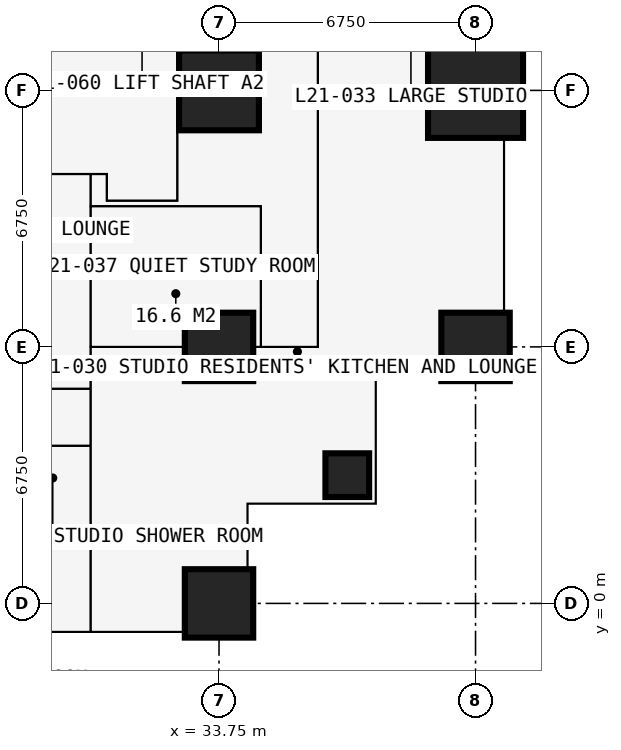
"""IFC4 building model, lengths in metres.
Left out: names, types, materials, properties, quantities, classifications, styles, units other than length and angle.
Written with IfcOpenShell. Run it as: python <this file> out.ifc"""

import sys

from ifc_helpers import new_model, si_unit, direction, frame, frame_2d, origin, origin_2d, place, context, subcontext, project, spatial, rectangle, extrude, element, fill, save


model = new_model("IFC4")
c1 = context("Model", 3, precision=1e-05, world=origin(), true_north=direction((0.0, 1.0)))
c2 = subcontext(c1, "Body", "Model", "MODEL_VIEW")
j1 = project(units=[si_unit("LENGTHUNIT", "METRE"), si_unit("PLANEANGLEUNIT", "RADIAN")], contexts=[c1])
p1 = place(None, origin())
s1 = spatial("IfcSite", under=j1, at=p1, CompositionType="ELEMENT")
p2 = place(p1, origin())
s2 = spatial("IfcBuilding", under=s1, at=p2, CompositionType="ELEMENT")
p3 = place(p2, frame((0.0, 0.0, 80.1)))
s3 = spatial("IfcBuildingStorey", under=s2, at=p3, CompositionType="ELEMENT", Elevation=80.1)
for number, where, z_axis, x_axis in (
    (1, (33.75, 0.0, 0.0), (0.0, 0.0, 1.0), (1.0, 0.0, 0.0)),
    (2, (33.75, 6.75, 0.0), (0.0, 0.0, 1.0), (1.0, 0.0, 0.0)),
):
    element("IfcColumn", number, at=place(p3, frame(where, z_axis=z_axis, x_axis=x_axis)), inside=s3, PredefinedType="COLUMN", context=c2, shape_type="SweptSolid", body=[
        extrude(rectangle(XDim=1.8, YDim=1.8, at=origin_2d()), origin(), (0.0, 0.0, 1.0), 3.6),
    ])
p4 = place(p3, frame((33.75, 13.5, 0.0), z_axis=(0.0, 0.0, 1.0), x_axis=(1.0, 0.0, 0.0)))
e3 = element("IfcColumn", 3, at=p4, inside=s3, PredefinedType="COLUMN", context=c2, shape_type="SweptSolid", body=[
    extrude(rectangle(XDim=2.1, YDim=2.1, at=origin_2d()), origin(), (0.0, 0.0, 1.0), 3.6),
])
p5 = place(p3, frame((37.125, 3.375, 0.0), z_axis=(0.0, 0.0, 1.0), x_axis=(1.0, 0.0, 0.0)))
e4 = element("IfcColumn", 4, at=p5, inside=s3, PredefinedType="COLUMN", context=c2, shape_type="SweptSolid", body=[
    extrude(rectangle(XDim=1.15, YDim=1.15, at=origin_2d()), origin(), (0.0, 0.0, 1.0), 3.6),
])
p6 = place(p3, frame((40.5, 6.75, 0.0), z_axis=(0.0, 0.0, 1.0), x_axis=(1.0, 0.0, 0.0)))
e5 = element("IfcColumn", 5, at=p6, inside=s3, PredefinedType="COLUMN", context=c2, shape_type="SweptSolid", body=[
    extrude(rectangle(XDim=1.8, YDim=1.8, at=origin_2d()), origin(), (0.0, 0.0, 1.0), 3.6),
])
p7 = place(p3, frame((40.5, 13.5, 0.0), z_axis=(0.0, 0.0, 1.0), x_axis=(1.0, 0.0, 0.0)))
e6 = element("IfcColumn", 6, at=p7, inside=s3, PredefinedType="COLUMN", context=c2, shape_type="SweptSolid", body=[
    extrude(rectangle(XDim=2.5, YDim=2.5, at=origin_2d()), origin(), (0.0, 0.0, 1.0), 3.6),
])
p8 = place(p3, frame((41.25, 20.25, 0.0), z_axis=(0.0, 0.0, 1.0), x_axis=(0.0, -1.0, 0.0)))
e7 = element("IfcWall", 7, at=p8, inside=s3, PredefinedType="SOLIDWALL", context=c2, shape_type="SweptSolid", body=[
    extrude(rectangle(XDim=6.75, YDim=0.15, at=frame_2d((3.375, 0.0))), origin(), (0.0, 0.0, 1.0), 3.375),
])
p9 = place(p8, frame((0.962, 0.0, 0.0)))
e8 = element("IfcOpeningElement", 8, at=p9, cuts=e7, PredefinedType="OPENING", context=c2, shape_type="SweptSolid", body=[
    extrude(rectangle(XDim=1.0, YDim=2.2, at=frame_2d((0.5, 1.1))), frame((0.0, 0.085, 0.0), z_axis=(0.0, -1.0, 0.0), x_axis=(1.0, 0.0, 0.0)), (0.0, 0.0, 1.0), 0.17),
])
p10 = place(p8, frame((2.025, 0.0, 0.9)))
e9 = element("IfcOpeningElement", 9, at=p10, cuts=e7, PredefinedType="OPENING", context=c2, shape_type="SweptSolid", body=[
    extrude(rectangle(XDim=1.2, YDim=1.8, at=frame_2d((0.6, 0.9))), frame((0.0, 0.085, 0.0), z_axis=(0.0, -1.0, 0.0), x_axis=(1.0, 0.0, 0.0)), (0.0, 0.0, 1.0), 0.17),
])
p11 = place(p8, frame((4.454, 0.0, 0.0)))
e10 = element("IfcOpeningElement", 10, at=p11, cuts=e7, PredefinedType="OPENING", context=c2, shape_type="SweptSolid", body=[
    extrude(rectangle(XDim=1.0, YDim=2.2, at=frame_2d((0.5, 1.1))), frame((0.0, 0.085, 0.0), z_axis=(0.0, -1.0, 0.0), x_axis=(1.0, 0.0, 0.0)), (0.0, 0.0, 1.0), 0.17),
])
p12 = place(p8, frame((3.508, 0.0, 0.9)))
e11 = element("IfcOpeningElement", 11, at=p12, cuts=e7, PredefinedType="OPENING", context=c2, shape_type="SweptSolid", body=[
    extrude(rectangle(XDim=0.9, YDim=1.8, at=frame_2d((0.45, 0.9))), frame((0.0, 0.085, 0.0), z_axis=(0.0, -1.0, 0.0), x_axis=(1.0, 0.0, 0.0)), (0.0, 0.0, 1.0), 0.17),
])
p13 = place(p3, frame((34.5, -0.75, 0.0), z_axis=(0.0, 0.0, 1.0), x_axis=(0.0, 1.0, 0.0)))
e12 = element("IfcWall", 12, at=p13, inside=s3, PredefinedType="SOLIDWALL", context=c2, shape_type="SweptSolid", body=[
    extrude(rectangle(XDim=3.375, YDim=0.3, at=frame_2d((1.688, 0.0))), origin(), (0.0, 0.0, 1.0), 3.375),
])
p14 = place(p13, frame((1.833, 0.0, 0.9)))
e13 = element("IfcOpeningElement", 13, at=p14, cuts=e12, PredefinedType="OPENING", context=c2, shape_type="SweptSolid", body=[
    extrude(rectangle(XDim=1.2, YDim=1.8, at=frame_2d((0.6, 0.9))), frame((0.0, 0.16, 0.0), z_axis=(0.0, -1.0, 0.0), x_axis=(1.0, 0.0, 0.0)), (0.0, 0.0, 1.0), 0.32),
])
p15 = place(p3, frame((34.5, 2.625, 0.0), z_axis=(0.0, 0.0, 1.0), x_axis=(1.0, 0.0, 0.0)))
e14 = element("IfcWall", 14, at=p15, inside=s3, PredefinedType="SOLIDWALL", context=c2, shape_type="SweptSolid", body=[
    extrude(rectangle(XDim=3.375, YDim=0.3, at=frame_2d((1.688, 0.0))), origin(), (0.0, 0.0, 1.0), 3.375),
])
p16 = place(p15, frame((0.788, 0.0, 0.6)))
e15 = element("IfcOpeningElement", 15, at=p16, cuts=e14, PredefinedType="OPENING", context=c2, shape_type="SweptSolid", body=[
    extrude(rectangle(XDim=1.8, YDim=2.1, at=frame_2d((0.9, 1.05))), frame((0.0, 0.16, 0.0), z_axis=(0.0, -1.0, 0.0), x_axis=(1.0, 0.0, 0.0)), (0.0, 0.0, 1.0), 0.32),
])
p17 = place(p3, frame((37.875, 2.625, 0.0), z_axis=(0.0, 0.0, 1.0), x_axis=(0.0, 1.0, 0.0)))
e16 = element("IfcWall", 16, at=p17, inside=s3, PredefinedType="SOLIDWALL", context=c2, shape_type="SweptSolid", body=[
    extrude(rectangle(XDim=3.375, YDim=0.3, at=frame_2d((1.688, 0.0))), origin(), (0.0, 0.0, 1.0), 3.375),
])
p18 = place(p17, frame((0.788, 0.0, 0.6)))
e17 = element("IfcOpeningElement", 17, at=p18, cuts=e16, PredefinedType="OPENING", context=c2, shape_type="SweptSolid", body=[
    extrude(rectangle(XDim=1.8, YDim=2.1, at=frame_2d((0.9, 1.05))), frame((0.0, 0.16, 0.0), z_axis=(0.0, -1.0, 0.0), x_axis=(1.0, 0.0, 0.0)), (0.0, 0.0, 1.0), 0.32),
])
p19 = place(p3, frame((37.875, 6.0, 0.0), z_axis=(0.0, 0.0, 1.0), x_axis=(1.0, 0.0, 0.0)))
e18 = element("IfcWall", 18, at=p19, inside=s3, PredefinedType="SOLIDWALL", context=c2, shape_type="SweptSolid", body=[
    extrude(rectangle(XDim=3.375, YDim=0.3, at=frame_2d((1.688, 0.0))), origin(), (0.0, 0.0, 1.0), 3.375),
])
p20 = place(p19, frame((0.343, 0.0, 0.9)))
e19 = element("IfcOpeningElement", 19, at=p20, cuts=e18, PredefinedType="OPENING", context=c2, shape_type="SweptSolid", body=[
    extrude(rectangle(XDim=1.2, YDim=1.8, at=frame_2d((0.6, 0.9))), frame((0.0, 0.16, 0.0), z_axis=(0.0, -1.0, 0.0), x_axis=(1.0, 0.0, 0.0)), (0.0, 0.0, 1.0), 0.32),
])
p21 = place(p3, frame((6.75, 4.15, 0.0), z_axis=(0.0, 0.0, 1.0), x_axis=(1.0, 0.0, 0.0)))
e20 = element("IfcWall", 20, at=p21, inside=s3, PredefinedType="PARTITIONING", context=c2, shape_type="SweptSolid", body=[
    extrude(rectangle(XDim=23.625, YDim=0.1, at=frame_2d((11.812, 0.0))), origin(), (0.0, 0.0, 1.0), 3.375),
])
p22 = place(p21, frame((1.2, 0.0, 0.0)))
e21 = element("IfcOpeningElement", 21, at=p22, cuts=e20, PredefinedType="OPENING", context=c2, shape_type="SweptSolid", body=[
    extrude(rectangle(XDim=1.0, YDim=2.2, at=frame_2d((0.5, 1.1))), frame((0.0, 0.06, 0.0), z_axis=(0.0, -1.0, 0.0), x_axis=(1.0, 0.0, 0.0)), (0.0, 0.0, 1.0), 0.12),
])
p23 = place(p21, frame((15.1, 0.0, 0.0)))
e22 = element("IfcOpeningElement", 22, at=p23, cuts=e20, PredefinedType="OPENING", context=c2, shape_type="SweptSolid", body=[
    extrude(rectangle(XDim=0.95, YDim=2.2, at=frame_2d((0.475, 1.1))), frame((0.0, 0.06, 0.0), z_axis=(0.0, -1.0, 0.0), x_axis=(1.0, 0.0, 0.0)), (0.0, 0.0, 1.0), 0.12),
])
p24 = place(p21, frame((8.35, 0.0, 0.0)))
e23 = element("IfcOpeningElement", 23, at=p24, cuts=e20, PredefinedType="OPENING", context=c2, shape_type="SweptSolid", body=[
    extrude(rectangle(XDim=0.95, YDim=2.2, at=frame_2d((0.475, 1.1))), frame((0.0, 0.06, 0.0), z_axis=(0.0, -1.0, 0.0), x_axis=(1.0, 0.0, 0.0)), (0.0, 0.0, 1.0), 0.12),
])
p25 = place(p21, frame((3.575, 0.0, 0.0)))
e24 = element("IfcOpeningElement", 24, at=p25, cuts=e20, PredefinedType="OPENING", context=c2, shape_type="SweptSolid", body=[
    extrude(rectangle(XDim=0.95, YDim=2.2, at=frame_2d((0.475, 1.1))), frame((0.0, 0.06, 0.0), z_axis=(0.0, -1.0, 0.0), x_axis=(1.0, 0.0, 0.0)), (0.0, 0.0, 1.0), 0.12),
])
p26 = place(p21, frame((20.5, 0.0, 0.0)))
e25 = element("IfcOpeningElement", 25, at=p26, cuts=e20, PredefinedType="OPENING", context=c2, shape_type="SweptSolid", body=[
    extrude(rectangle(XDim=0.95, YDim=2.2, at=frame_2d((0.475, 1.1))), frame((0.0, 0.06, 0.0), z_axis=(0.0, -1.0, 0.0), x_axis=(1.0, 0.0, 0.0)), (0.0, 0.0, 1.0), 0.12),
])
p27 = place(p3, frame((10.125, 11.3, 0.0), z_axis=(0.0, 0.0, 1.0), x_axis=(1.0, 0.0, 0.0)))
e26 = element("IfcWall", 26, at=p27, inside=s3, PredefinedType="PARTITIONING", context=c2, shape_type="SweptSolid", body=[
    extrude(rectangle(XDim=20.675, YDim=0.15, at=frame_2d((10.337, 0.0))), origin(), (0.0, 0.0, 1.0), 3.375),
])
p28 = place(p27, frame((11.312, 0.0, 0.0)))
e27 = element("IfcOpeningElement", 27, at=p28, cuts=e26, PredefinedType="OPENING", context=c2, shape_type="SweptSolid", body=[
    extrude(rectangle(XDim=1.0, YDim=2.2, at=frame_2d((0.5, 1.1))), frame((0.0, 0.085, 0.0), z_axis=(0.0, -1.0, 0.0), x_axis=(1.0, 0.0, 0.0)), (0.0, 0.0, 1.0), 0.17),
])
p29 = place(p3, frame((22.988, 5.65, 0.0), z_axis=(0.0, 0.0, 1.0), x_axis=(1.0, 0.0, 0.0)))
e28 = element("IfcWall", 28, at=p29, inside=s3, PredefinedType="PARTITIONING", context=c2, shape_type="SweptSolid", body=[
    extrude(rectangle(XDim=7.387, YDim=0.15, at=frame_2d((3.694, 0.0))), origin(), (0.0, 0.0, 1.0), 3.375),
])
p30 = place(p29, frame((2.0, 0.0, 0.0)))
e29 = element("IfcOpeningElement", 29, at=p30, cuts=e28, PredefinedType="OPENING", context=c2, shape_type="SweptSolid", body=[
    extrude(rectangle(XDim=0.95, YDim=2.2, at=frame_2d((0.475, 1.1))), frame((0.0, 0.085, 0.0), z_axis=(0.0, -1.0, 0.0), x_axis=(1.0, 0.0, 0.0)), (0.0, 0.0, 1.0), 0.17),
])
p31 = place(p3, frame((28.375, 1.95, 0.0), z_axis=(0.0, 0.0, 1.0), x_axis=(1.0, 0.0, 0.0)))
e30 = element("IfcWall", 30, at=p31, inside=s3, PredefinedType="PARTITIONING", context=c2, shape_type="SweptSolid", body=[
    extrude(rectangle(XDim=2.0, YDim=0.1, at=frame_2d((1.0, 0.0))), origin(), (0.0, 0.0, 1.0), 3.375),
])
p32 = place(p3, frame((30.375, -0.734, 0.0), z_axis=(0.0, 0.0, 1.0), x_axis=(0.0, 1.0, 0.0)))
e31 = element("IfcWall", 31, at=p32, inside=s3, PredefinedType="PARTITIONING", context=c2, shape_type="SweptSolid", body=[
    extrude(rectangle(XDim=12.034, YDim=0.15, at=frame_2d((6.017, 0.0))), origin(), (0.0, 0.0, 1.0), 3.375),
])
p33 = place(p32, frame((5.134, 0.0, 0.0)))
e32 = element("IfcOpeningElement", 32, at=p33, cuts=e31, PredefinedType="OPENING", context=c2, shape_type="SweptSolid", body=[
    extrude(rectangle(XDim=1.0, YDim=2.2, at=frame_2d((0.5, 1.1))), frame((0.0, 0.085, 0.0), z_axis=(0.0, -1.0, 0.0), x_axis=(1.0, 0.0, 0.0)), (0.0, 0.0, 1.0), 0.17),
])
p34 = place(p3, frame((30.375, 6.75, 0.0), z_axis=(0.0, 0.0, 1.0), x_axis=(1.0, 0.0, 0.0)))
e33 = element("IfcWall", 33, at=p34, inside=s3, PredefinedType="PARTITIONING", context=c2, shape_type="SweptSolid", body=[
    extrude(rectangle(XDim=5.975, YDim=0.15, at=frame_2d((2.988, 0.0))), origin(), (0.0, 0.0, 1.0), 2.877),
])
p35 = place(p3, frame((30.375, 10.45, 0.0), z_axis=(0.0, 0.0, 1.0), x_axis=(1.0, 0.0, 0.0)))
e34 = element("IfcWall", 34, at=p35, inside=s3, PredefinedType="PARTITIONING", context=c2, shape_type="SweptSolid", body=[
    extrude(rectangle(XDim=4.475, YDim=0.15, at=frame_2d((2.238, 0.0))), origin(), (0.0, 0.0, 1.0), 3.375),
])
p36 = place(p35, frame((2.35, 0.0, 0.0)))
e35 = element("IfcOpeningElement", 35, at=p36, cuts=e34, PredefinedType="OPENING", context=c2, shape_type="SweptSolid", body=[
    extrude(rectangle(XDim=0.95, YDim=2.2, at=frame_2d((0.475, 1.1))), frame((0.0, 0.085, 0.0), z_axis=(0.0, -1.0, 0.0), x_axis=(1.0, 0.0, 0.0)), (0.0, 0.0, 1.0), 0.17),
])
p37 = place(p3, frame((30.8, 10.6, 0.0), z_axis=(0.0, 0.0, 1.0), x_axis=(0.0, 1.0, 0.0)))
e36 = element("IfcWall", 36, at=p37, inside=s3, PredefinedType="PARTITIONING", context=c2, shape_type="SweptSolid", body=[
    extrude(rectangle(XDim=0.7, YDim=0.15, at=frame_2d((0.35, 0.0))), origin(), (0.0, 0.0, 1.0), 3.375),
])
p38 = place(p3, frame((30.8, 10.6, 0.0), z_axis=(0.0, 0.0, 1.0), x_axis=(1.0, 0.0, 0.0)))
e37 = element("IfcWall", 37, at=p38, inside=s3, PredefinedType="PARTITIONING", context=c2, shape_type="SweptSolid", body=[
    extrude(rectangle(XDim=1.85, YDim=0.15, at=frame_2d((0.925, 0.0))), origin(), (0.0, 0.0, 1.0), 3.375),
])
p39 = place(p3, frame((32.65, 10.6, 0.0), z_axis=(0.0, 0.0, 1.0), x_axis=(0.0, 1.0, 0.0)))
e38 = element("IfcWall", 38, at=p39, inside=s3, PredefinedType="SHEAR", context=c2, shape_type="SweptSolid", body=[
    extrude(rectangle(XDim=9.3, YDim=0.1, at=frame_2d((4.65, 0.0))), origin(), (0.0, 0.0, 1.0), 3.375),
])
p40 = place(p39, frame((0.5, 0.0, 0.0)))
e39 = element("IfcOpeningElement", 39, at=p40, cuts=e38, PredefinedType="OPENING", context=c2, shape_type="SweptSolid", body=[
    extrude(rectangle(XDim=1.0, YDim=2.2, at=frame_2d((0.5, 1.1))), frame((0.0, 0.06, 0.0), z_axis=(0.0, -1.0, 0.0), x_axis=(1.0, 0.0, 0.0)), (0.0, 0.0, 1.0), 0.12),
])
p41 = place(p3, frame((32.65, 12.55, 0.0), z_axis=(0.0, 0.0, 1.0), x_axis=(1.0, 0.0, 0.0)))
e40 = element("IfcWall", 40, at=p41, inside=s3, PredefinedType="PARTITIONING", context=c2, shape_type="SweptSolid", body=[
    extrude(rectangle(XDim=2.2, YDim=0.15, at=frame_2d((1.1, 0.0))), origin(), (0.0, 0.0, 1.0), 3.375),
])
p42 = place(p3, frame((34.85, 6.75, 0.0), z_axis=(0.0, 0.0, 1.0), x_axis=(0.0, 1.0, 0.0)))
e41 = element("IfcWall", 41, at=p42, inside=s3, PredefinedType="PARTITIONING", context=c2, shape_type="SweptSolid", body=[
    extrude(rectangle(XDim=3.7, YDim=0.15, at=frame_2d((1.85, 0.0))), origin(), (0.0, 0.0, 1.0), 3.375),
])
p43 = place(p3, frame((34.85, 12.55, 0.0), z_axis=(0.0, 0.0, 1.0), x_axis=(0.0, 1.0, 0.0)))
e42 = element("IfcWall", 42, at=p43, inside=s3, PredefinedType="PARTITIONING", context=c2, shape_type="SweptSolid", body=[
    extrude(rectangle(XDim=17.825, YDim=0.15, at=frame_2d((8.913, 0.0))), origin(), (0.0, 0.0, 1.0), 3.375),
])
p44 = place(p43, frame((8.6, 0.0, 0.0)))
e43 = element("IfcOpeningElement", 43, at=p44, cuts=e42, PredefinedType="OPENING", context=c2, shape_type="SweptSolid", body=[
    extrude(rectangle(XDim=0.95, YDim=2.2, at=frame_2d((0.475, 1.1))), frame((0.0, 0.085, 0.0), z_axis=(0.0, -1.0, 0.0), x_axis=(1.0, 0.0, 0.0)), (0.0, 0.0, 1.0), 0.17),
])
p45 = place(p3, frame((36.35, 6.75, 0.0), z_axis=(0.0, 0.0, 1.0), x_axis=(0.0, 1.0, 0.0)))
e44 = element("IfcWall", 44, at=p45, inside=s3, PredefinedType="PARTITIONING", context=c2, shape_type="SweptSolid", body=[
    extrude(rectangle(XDim=20.25, YDim=0.15, at=frame_2d((10.125, 0.0))), origin(), (0.0, 0.0, 1.0), 3.375),
])
p46 = place(p45, frame((15.1, 0.0, 0.0)))
e45 = element("IfcOpeningElement", 45, at=p46, cuts=e44, PredefinedType="OPENING", context=c2, shape_type="SweptSolid", body=[
    extrude(rectangle(XDim=0.95, YDim=2.2, at=frame_2d((0.475, 1.1))), frame((0.0, 0.085, 0.0), z_axis=(0.0, -1.0, 0.0), x_axis=(1.0, 0.0, 0.0)), (0.0, 0.0, 1.0), 0.17),
])
p47 = place(p45, frame((8.35, 0.0, 0.0)))
e46 = element("IfcOpeningElement", 46, at=p47, cuts=e44, PredefinedType="OPENING", context=c2, shape_type="SweptSolid", body=[
    extrude(rectangle(XDim=0.95, YDim=2.2, at=frame_2d((0.475, 1.1))), frame((0.0, 0.085, 0.0), z_axis=(0.0, -1.0, 0.0), x_axis=(1.0, 0.0, 0.0)), (0.0, 0.0, 1.0), 0.17),
])
p48 = place(p3, frame((36.35, 13.5, 0.0), z_axis=(0.0, 0.0, 1.0), x_axis=(1.0, 0.0, 0.0)))
e47 = element("IfcWall", 47, at=p48, inside=s3, PredefinedType="PARTITIONING", context=c2, shape_type="SweptSolid", body=[
    extrude(rectangle(XDim=4.884, YDim=0.15, at=frame_2d((2.442, 0.0))), origin(), (0.0, 0.0, 1.0), 2.877),
])
p49 = place(p14, origin())
e48 = element("IfcWindow", 48, at=p49, inside=s3, PartitioningType="SINGLE_PANEL", PredefinedType="WINDOW", context=c2, shape_type="SweptSolid", body=[
    extrude(rectangle(XDim=1.2, YDim=1.8, at=frame_2d((0.6, 0.9))), frame((0.0, 0.03, 0.0), z_axis=(0.0, -1.0, 0.0), x_axis=(1.0, 0.0, 0.0)), (0.0, 0.0, 1.0), 0.06),
])
fill(e13, e48)
p50 = place(p16, origin())
e49 = element("IfcWindow", 49, at=p50, inside=s3, PartitioningType="SINGLE_PANEL", PredefinedType="WINDOW", context=c2, shape_type="SweptSolid", body=[
    extrude(rectangle(XDim=1.8, YDim=2.1, at=frame_2d((0.9, 1.05))), frame((0.0, 0.03, 0.0), z_axis=(0.0, -1.0, 0.0), x_axis=(1.0, 0.0, 0.0)), (0.0, 0.0, 1.0), 0.06),
])
fill(e15, e49)
p51 = place(p18, origin())
e50 = element("IfcWindow", 50, at=p51, inside=s3, PartitioningType="SINGLE_PANEL", PredefinedType="WINDOW", context=c2, shape_type="SweptSolid", body=[
    extrude(rectangle(XDim=1.8, YDim=2.1, at=frame_2d((0.9, 1.05))), frame((0.0, 0.03, 0.0), z_axis=(0.0, -1.0, 0.0), x_axis=(1.0, 0.0, 0.0)), (0.0, 0.0, 1.0), 0.06),
])
fill(e17, e50)
p52 = place(p20, origin())
e51 = element("IfcWindow", 51, at=p52, inside=s3, PartitioningType="SINGLE_PANEL", PredefinedType="WINDOW", context=c2, shape_type="SweptSolid", body=[
    extrude(rectangle(XDim=1.2, YDim=1.8, at=frame_2d((0.6, 0.9))), frame((0.0, 0.03, 0.0), z_axis=(0.0, -1.0, 0.0), x_axis=(1.0, 0.0, 0.0)), (0.0, 0.0, 1.0), 0.06),
])
fill(e19, e51)
p53 = place(p33, origin())
e52 = element("IfcDoor", 52, at=p53, inside=s3, OperationType="SINGLE_SWING_LEFT", PredefinedType="DOOR", context=c2, shape_type="SweptSolid", body=[
    extrude(rectangle(XDim=1.0, YDim=2.2, at=frame_2d((0.5, 1.1))), frame((0.0, 0.025, 0.0), z_axis=(0.0, -1.0, 0.0), x_axis=(1.0, 0.0, 0.0)), (0.0, 0.0, 1.0), 0.05),
])
fill(e32, e52)
p54 = place(p40, origin())
e53 = element("IfcDoor", 53, at=p54, inside=s3, OperationType="SINGLE_SWING_LEFT", PredefinedType="DOOR", context=c2, shape_type="SweptSolid", body=[
    extrude(rectangle(XDim=1.0, YDim=2.2, at=frame_2d((0.5, 1.1))), frame((0.0, 0.025, 0.0), z_axis=(0.0, -1.0, 0.0), x_axis=(1.0, 0.0, 0.0)), (0.0, 0.0, 1.0), 0.05),
])
fill(e39, e53)
p55 = place(p36, origin())
e54 = element("IfcDoor", 54, at=p55, inside=s3, OperationType="SINGLE_SWING_LEFT", PredefinedType="DOOR", context=c2, shape_type="SweptSolid", body=[
    extrude(rectangle(XDim=0.95, YDim=2.2, at=frame_2d((0.475, 1.1))), frame((0.0, 0.025, 0.0), z_axis=(0.0, -1.0, 0.0), x_axis=(1.0, 0.0, 0.0)), (0.0, 0.0, 1.0), 0.05),
])
fill(e35, e54)
save(model, sys.argv[1])
